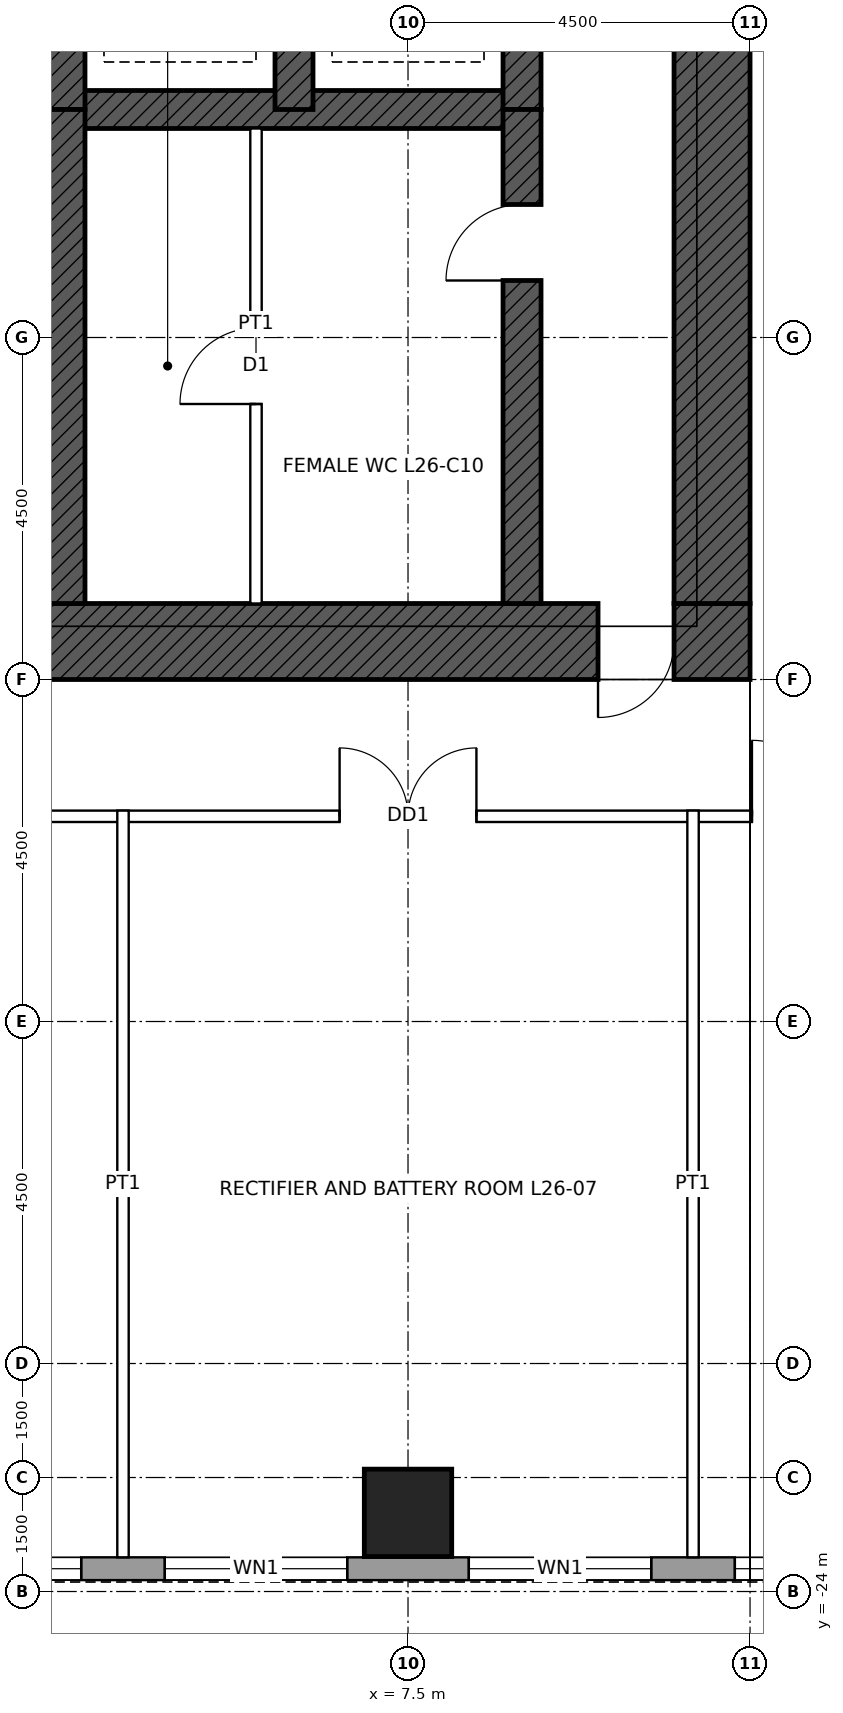
"""IFC4 building model, lengths in metres.
Left out: names, types, materials, properties, quantities, classifications, styles, units other than length and angle.
Written with IfcOpenShell. Run it as: python <this file> out.ifc"""

import sys

from ifc_helpers import new_model, si_unit, direction, frame, frame_2d, origin, origin_2d, place, context, subcontext, project, spatial, rectangle, hollow_rectangle, extrude, element, fill, save


model = new_model("IFC4")
c1 = context("Model", 3, precision=1e-05, world=origin(), true_north=direction((0.0, 1.0)))
c2 = subcontext(c1, "Body", "Model", "MODEL_VIEW")
j1 = project(units=[si_unit("LENGTHUNIT", "METRE"), si_unit("PLANEANGLEUNIT", "RADIAN")], contexts=[c1])
p1 = place(None, origin())
s1 = spatial("IfcSite", under=j1, at=p1, CompositionType="ELEMENT")
p2 = place(p1, origin())
s2 = spatial("IfcBuilding", under=s1, at=p2, CompositionType="ELEMENT")
p3 = place(p2, frame((0.0, 0.0, 131.4)))
s3 = spatial("IfcBuildingStorey", under=s2, at=p3, CompositionType="ELEMENT", Elevation=131.4)
p4 = place(p3, frame((7.5, -22.965, 0.0), z_axis=(0.0, 0.0, 1.0), x_axis=(1.0, 0.0, 0.0)))
e1 = element("IfcColumn", 1, at=p4, inside=s3, PredefinedType="COLUMN", context=c2, shape_type="SweptSolid", body=[
    extrude(hollow_rectangle(XDim=1.15, YDim=1.15, WallThickness=0.075, at=origin_2d()), origin(), (0.0, 0.0, 1.0), 4.5),
])
p5 = place(p3, frame((12.0, -11.5, 0.0), z_axis=(0.0, 0.0, 1.0), x_axis=(-1.0, 0.0, 0.0)))
e2 = element("IfcWall", 2, at=p5, inside=s3, PredefinedType="SHEAR", context=c2, shape_type="SweptSolid", body=[
    extrude(rectangle(XDim=24.0, YDim=1.0, at=frame_2d((12.0, 0.0))), origin(), (0.0, 0.0, 1.0), 4.5),
])
p6 = place(p5, frame((11.5, 0.0, 0.0)))
e3 = element("IfcOpeningElement", 3, at=p6, cuts=e2, PredefinedType="OPENING", context=c2, shape_type="SweptSolid", body=[
    extrude(rectangle(XDim=1.0, YDim=2.1, at=frame_2d((0.5, 1.05))), frame((0.0, 0.51, 0.0), z_axis=(0.0, -1.0, 0.0), x_axis=(1.0, 0.0, 0.0)), (0.0, 0.0, 1.0), 1.02),
])
p7 = place(p5, frame((1.0, 0.0, 0.0)))
e4 = element("IfcOpeningElement", 4, at=p7, cuts=e2, PredefinedType="OPENING", context=c2, shape_type="SweptSolid", body=[
    extrude(rectangle(XDim=1.0, YDim=2.4, at=frame_2d((0.5, 1.2))), frame((0.0, 0.51, 0.0), z_axis=(0.0, -1.0, 0.0), x_axis=(1.0, 0.0, 0.0)), (0.0, 0.0, 1.0), 1.02),
])
p8 = place(p3, frame((11.5, 11.0, 0.0), z_axis=(0.0, 0.0, 1.0), x_axis=(0.0, -1.0, 0.0)))
e5 = element("IfcWall", 5, at=p8, inside=s3, PredefinedType="SHEAR", context=c2, shape_type="SweptSolid", body=[
    extrude(rectangle(XDim=22.0, YDim=1.0, at=frame_2d((11.0, 0.0))), origin(), (0.0, 0.0, 1.0), 4.5),
])
p9 = place(p8, frame((10.5, 0.0, 0.0)))
e6 = element("IfcOpeningElement", 6, at=p9, cuts=e5, PredefinedType="OPENING", context=c2, shape_type="SweptSolid", body=[
    extrude(rectangle(XDim=1.0, YDim=2.4, at=frame_2d((0.5, 1.2))), frame((0.0, 0.51, 0.0), z_axis=(0.0, -1.0, 0.0), x_axis=(1.0, 0.0, 0.0)), (0.0, 0.0, 1.0), 1.02),
])
p10 = place(p3, frame((-9.0, -4.5, 0.0), z_axis=(0.0, 0.0, 1.0), x_axis=(1.0, 0.0, 0.0)))
e7 = element("IfcWall", 7, at=p10, inside=s3, PredefinedType="SHEAR", context=c2, shape_type="SweptSolid", body=[
    extrude(rectangle(XDim=18.0, YDim=0.5, at=frame_2d((9.0, 0.0))), origin(), (0.0, 0.0, 1.0), 4.5),
])
for number, where, z_axis, x_axis in (
    (8, (9.0, -4.5, 0.0), (0.0, 0.0, 1.0), (0.0, 1.0, 0.0)),
    (9, (3.0, -4.5, 0.0), (0.0, 0.0, 1.0), (0.0, 1.0, 0.0)),
    (10, (6.0, -4.5, 0.0), (0.0, 0.0, 1.0), (0.0, 1.0, 0.0)),
):
    element("IfcWall", number, at=place(p3, frame(where, z_axis=z_axis, x_axis=x_axis)), inside=s3, PredefinedType="SHEAR", context=c2, shape_type="SweptSolid", body=[
        extrude(rectangle(XDim=3.0, YDim=0.5, at=frame_2d((1.5, 0.0))), origin(), (0.0, 0.0, 1.0), 4.5),
    ])
p11 = place(p3, frame((9.0, -11.0, 0.0), z_axis=(0.0, 0.0, 1.0), x_axis=(0.0, 1.0, 0.0)))
e11 = element("IfcWall", 11, at=p11, inside=s3, PredefinedType="SHEAR", context=c2, shape_type="SweptSolid", body=[
    extrude(rectangle(XDim=6.5, YDim=0.5, at=frame_2d((3.25, 0.0))), origin(), (0.0, 0.0, 1.0), 4.5),
])
p12 = place(p11, frame((4.25, 0.0, 0.0)))
e12 = element("IfcOpeningElement", 12, at=p12, cuts=e11, PredefinedType="OPENING", context=c2, shape_type="SweptSolid", body=[
    extrude(rectangle(XDim=1.0, YDim=2.1, at=frame_2d((0.5, 1.05))), frame((0.0, 0.26, 0.0), z_axis=(0.0, -1.0, 0.0), x_axis=(1.0, 0.0, 0.0)), (0.0, 0.0, 1.0), 0.52),
])
p13 = place(p3, frame((3.0, -11.0, 0.0), z_axis=(0.0, 0.0, 1.0), x_axis=(0.0, 1.0, 0.0)))
e13 = element("IfcWall", 13, at=p13, inside=s3, PredefinedType="SHEAR", context=c2, shape_type="SweptSolid", body=[
    extrude(rectangle(XDim=6.5, YDim=0.5, at=frame_2d((3.25, 0.0))), origin(), (0.0, 0.0, 1.0), 4.5),
])
p14 = place(p3, frame((16.2, -23.7, 0.0), z_axis=(0.0, 0.0, 1.0), x_axis=(-1.0, 0.0, 0.0)))
e14 = element("IfcWall", 14, at=p14, inside=s3, PredefinedType="SOLIDWALL", context=c2, shape_type="SweptSolid", body=[
    extrude(rectangle(XDim=32.4, YDim=0.3, at=frame_2d((16.2, 0.0))), origin(), (0.0, 0.0, 1.0), 4.3),
])
p15 = place(p14, frame((2.0, 0.0, 1.0)))
e15 = element("IfcOpeningElement", 15, at=p15, cuts=e14, PredefinedType="OPENING", context=c2, shape_type="SweptSolid", body=[
    extrude(rectangle(XDim=2.4, YDim=1.2, at=frame_2d((1.2, 0.6))), frame((0.0, 0.16, 0.0), z_axis=(0.0, -1.0, 0.0), x_axis=(1.0, 0.0, 0.0)), (0.0, 0.0, 1.0), 0.32),
])
p16 = place(p14, frame((5.5, 0.0, 1.0)))
e16 = element("IfcOpeningElement", 16, at=p16, cuts=e14, PredefinedType="OPENING", context=c2, shape_type="SweptSolid", body=[
    extrude(rectangle(XDim=2.4, YDim=1.2, at=frame_2d((1.2, 0.6))), frame((0.0, 0.16, 0.0), z_axis=(0.0, -1.0, 0.0), x_axis=(1.0, 0.0, 0.0)), (0.0, 0.0, 1.0), 0.32),
])
p17 = place(p14, frame((9.5, 0.0, 1.0)))
e17 = element("IfcOpeningElement", 17, at=p17, cuts=e14, PredefinedType="OPENING", context=c2, shape_type="SweptSolid", body=[
    extrude(rectangle(XDim=2.4, YDim=1.2, at=frame_2d((1.2, 0.6))), frame((0.0, 0.16, 0.0), z_axis=(0.0, -1.0, 0.0), x_axis=(1.0, 0.0, 0.0)), (0.0, 0.0, 1.0), 0.32),
])
p18 = place(p14, frame((13.0, 0.0, 1.0)))
e18 = element("IfcOpeningElement", 18, at=p18, cuts=e14, PredefinedType="OPENING", context=c2, shape_type="SweptSolid", body=[
    extrude(rectangle(XDim=2.4, YDim=1.2, at=frame_2d((1.2, 0.6))), frame((0.0, 0.16, 0.0), z_axis=(0.0, -1.0, 0.0), x_axis=(1.0, 0.0, 0.0)), (0.0, 0.0, 1.0), 0.32),
])
p19 = place(p14, frame((17.0, 0.0, 1.0)))
e19 = element("IfcOpeningElement", 19, at=p19, cuts=e14, PredefinedType="OPENING", context=c2, shape_type="SweptSolid", body=[
    extrude(rectangle(XDim=2.4, YDim=1.2, at=frame_2d((1.2, 0.6))), frame((0.0, 0.16, 0.0), z_axis=(0.0, -1.0, 0.0), x_axis=(1.0, 0.0, 0.0)), (0.0, 0.0, 1.0), 0.32),
])
p20 = place(p14, frame((20.5, 0.0, 1.0)))
e20 = element("IfcOpeningElement", 20, at=p20, cuts=e14, PredefinedType="OPENING", context=c2, shape_type="SweptSolid", body=[
    extrude(rectangle(XDim=2.4, YDim=1.2, at=frame_2d((1.2, 0.6))), frame((0.0, 0.16, 0.0), z_axis=(0.0, -1.0, 0.0), x_axis=(1.0, 0.0, 0.0)), (0.0, 0.0, 1.0), 0.32),
])
p21 = place(p14, frame((24.5, 0.0, 1.0)))
e21 = element("IfcOpeningElement", 21, at=p21, cuts=e14, PredefinedType="OPENING", context=c2, shape_type="SweptSolid", body=[
    extrude(rectangle(XDim=2.4, YDim=1.2, at=frame_2d((1.2, 0.6))), frame((0.0, 0.16, 0.0), z_axis=(0.0, -1.0, 0.0), x_axis=(1.0, 0.0, 0.0)), (0.0, 0.0, 1.0), 0.32),
])
p22 = place(p14, frame((28.0, 0.0, 1.0)))
e22 = element("IfcOpeningElement", 22, at=p22, cuts=e14, PredefinedType="OPENING", context=c2, shape_type="SweptSolid", body=[
    extrude(rectangle(XDim=2.4, YDim=1.2, at=frame_2d((1.2, 0.6))), frame((0.0, 0.16, 0.0), z_axis=(0.0, -1.0, 0.0), x_axis=(1.0, 0.0, 0.0)), (0.0, 0.0, 1.0), 0.32),
])
p23 = place(p3, frame((-13.875, -13.8, 0.0), z_axis=(0.0, 0.0, 1.0), x_axis=(1.0, 0.0, 0.0)))
e23 = element("IfcWall", 23, at=p23, inside=s3, PredefinedType="PARTITIONING", context=c2, shape_type="SweptSolid", body=[
    extrude(rectangle(XDim=27.75, YDim=0.15, at=frame_2d((13.875, 0.0))), origin(), (0.0, 0.0, 1.0), 4.3),
])
p24 = place(p23, frame((20.475, 0.0, 0.0)))
e24 = element("IfcOpeningElement", 24, at=p24, cuts=e23, PredefinedType="OPENING", context=c2, shape_type="SweptSolid", body=[
    extrude(rectangle(XDim=1.8, YDim=2.4, at=frame_2d((0.9, 1.2))), frame((0.0, 0.085, 0.0), z_axis=(0.0, -1.0, 0.0), x_axis=(1.0, 0.0, 0.0)), (0.0, 0.0, 1.0), 0.17),
])
p25 = place(p23, frame((10.525, 0.0, 0.0)))
e25 = element("IfcOpeningElement", 25, at=p25, cuts=e23, PredefinedType="OPENING", context=c2, shape_type="SweptSolid", body=[
    extrude(rectangle(XDim=1.8, YDim=2.4, at=frame_2d((0.9, 1.2))), frame((0.0, 0.085, 0.0), z_axis=(0.0, -1.0, 0.0), x_axis=(1.0, 0.0, 0.0)), (0.0, 0.0, 1.0), 0.17),
])
p26 = place(p23, frame((5.475, 0.0, 0.0)))
e26 = element("IfcOpeningElement", 26, at=p26, cuts=e23, PredefinedType="OPENING", context=c2, shape_type="SweptSolid", body=[
    extrude(rectangle(XDim=1.8, YDim=2.4, at=frame_2d((0.9, 1.2))), frame((0.0, 0.085, 0.0), z_axis=(0.0, -1.0, 0.0), x_axis=(1.0, 0.0, 0.0)), (0.0, 0.0, 1.0), 0.17),
])
p27 = place(p23, frame((25.9, 0.0, 0.0)))
e27 = element("IfcOpeningElement", 27, at=p27, cuts=e23, PredefinedType="OPENING", context=c2, shape_type="SweptSolid", body=[
    extrude(rectangle(XDim=1.0, YDim=2.1, at=frame_2d((0.5, 1.05))), frame((0.0, 0.085, 0.0), z_axis=(0.0, -1.0, 0.0), x_axis=(1.0, 0.0, 0.0)), (0.0, 0.0, 1.0), 0.17),
])
p28 = place(p23, frame((0.85, 0.0, 0.0)))
e28 = element("IfcOpeningElement", 28, at=p28, cuts=e23, PredefinedType="OPENING", context=c2, shape_type="SweptSolid", body=[
    extrude(rectangle(XDim=1.0, YDim=2.1, at=frame_2d((0.5, 1.05))), frame((0.0, 0.085, 0.0), z_axis=(0.0, -1.0, 0.0), x_axis=(1.0, 0.0, 0.0)), (0.0, 0.0, 1.0), 0.17),
])
for number, where, z_axis, x_axis in (
    (29, (3.75, -23.55, 0.0), (0.0, 0.0, 1.0), (0.0, 1.0, 0.0)),
    (30, (11.25, -23.55, 0.0), (0.0, 0.0, 1.0), (0.0, 1.0, 0.0)),
):
    element("IfcWall", number, at=place(p3, frame(where, z_axis=z_axis, x_axis=x_axis)), inside=s3, PredefinedType="PARTITIONING", context=c2, shape_type="SweptSolid", body=[
        extrude(rectangle(XDim=9.825, YDim=0.15, at=frame_2d((4.913, 0.0))), origin(), (0.0, 0.0, 1.0), 3.431),
    ])
p29 = place(p3, frame((5.5, -11.0, 0.0), z_axis=(0.0, 0.0, 1.0), x_axis=(0.0, 1.0, 0.0)))
e31 = element("IfcWall", 31, at=p29, inside=s3, PredefinedType="PARTITIONING", context=c2, shape_type="SweptSolid", body=[
    extrude(rectangle(XDim=6.25, YDim=0.15, at=frame_2d((3.125, 0.0))), origin(), (0.0, 0.0, 1.0), 4.25),
])
p30 = place(p29, frame((2.625, 0.0, 0.0)))
e32 = element("IfcOpeningElement", 32, at=p30, cuts=e31, PredefinedType="OPENING", context=c2, shape_type="SweptSolid", body=[
    extrude(rectangle(XDim=1.0, YDim=2.1, at=frame_2d((0.5, 1.05))), frame((0.0, 0.085, 0.0), z_axis=(0.0, -1.0, 0.0), x_axis=(1.0, 0.0, 0.0)), (0.0, 0.0, 1.0), 0.17),
])
p31 = place(p15, origin())
e33 = element("IfcWindow", 33, at=p31, inside=s3, PartitioningType="SINGLE_PANEL", PredefinedType="WINDOW", context=c2, shape_type="SweptSolid", body=[
    extrude(rectangle(XDim=2.4, YDim=1.2, at=frame_2d((1.2, 0.6))), frame((0.0, 0.03, 0.0), z_axis=(0.0, -1.0, 0.0), x_axis=(1.0, 0.0, 0.0)), (0.0, 0.0, 1.0), 0.06),
])
fill(e15, e33)
p32 = place(p16, origin())
e34 = element("IfcWindow", 34, at=p32, inside=s3, PartitioningType="SINGLE_PANEL", PredefinedType="WINDOW", context=c2, shape_type="SweptSolid", body=[
    extrude(rectangle(XDim=2.4, YDim=1.2, at=frame_2d((1.2, 0.6))), frame((0.0, 0.03, 0.0), z_axis=(0.0, -1.0, 0.0), x_axis=(1.0, 0.0, 0.0)), (0.0, 0.0, 1.0), 0.06),
])
fill(e16, e34)
p33 = place(p17, origin())
e35 = element("IfcWindow", 35, at=p33, inside=s3, PartitioningType="SINGLE_PANEL", PredefinedType="WINDOW", context=c2, shape_type="SweptSolid", body=[
    extrude(rectangle(XDim=2.4, YDim=1.2, at=frame_2d((1.2, 0.6))), frame((0.0, 0.03, 0.0), z_axis=(0.0, -1.0, 0.0), x_axis=(1.0, 0.0, 0.0)), (0.0, 0.0, 1.0), 0.06),
])
fill(e17, e35)
p34 = place(p18, origin())
e36 = element("IfcWindow", 36, at=p34, inside=s3, PartitioningType="SINGLE_PANEL", PredefinedType="WINDOW", context=c2, shape_type="SweptSolid", body=[
    extrude(rectangle(XDim=2.4, YDim=1.2, at=frame_2d((1.2, 0.6))), frame((0.0, 0.03, 0.0), z_axis=(0.0, -1.0, 0.0), x_axis=(1.0, 0.0, 0.0)), (0.0, 0.0, 1.0), 0.06),
])
fill(e18, e36)
p35 = place(p7, origin())
e37 = element("IfcDoor", 37, at=p35, inside=s3, OperationType="SINGLE_SWING_RIGHT", PredefinedType="DOOR", context=c2, shape_type="SweptSolid", body=[
    extrude(rectangle(XDim=1.0, YDim=2.4, at=frame_2d((0.5, 1.2))), frame((0.0, 0.485, 0.0), z_axis=(0.0, -1.0, 0.0), x_axis=(1.0, 0.0, 0.0)), (0.0, 0.0, 1.0), 0.05),
])
fill(e4, e37)
p36 = place(p12, origin())
e38 = element("IfcDoor", 38, at=p36, inside=s3, OperationType="SINGLE_SWING_LEFT", PredefinedType="DOOR", context=c2, shape_type="SweptSolid", body=[
    extrude(rectangle(XDim=1.0, YDim=2.1, at=frame_2d((0.5, 1.05))), frame((0.0, 0.025, 0.0), z_axis=(0.0, -1.0, 0.0), x_axis=(1.0, 0.0, 0.0)), (0.0, 0.0, 1.0), 0.05),
])
fill(e12, e38)
p37 = place(p30, origin())
e39 = element("IfcDoor", 39, at=p37, inside=s3, OperationType="SINGLE_SWING_LEFT", PredefinedType="DOOR", context=c2, shape_type="SweptSolid", body=[
    extrude(rectangle(XDim=1.0, YDim=2.1, at=frame_2d((0.5, 1.05))), frame((0.0, 0.025, 0.0), z_axis=(0.0, -1.0, 0.0), x_axis=(1.0, 0.0, 0.0)), (0.0, 0.0, 1.0), 0.05),
])
fill(e32, e39)
p38 = place(p24, origin())
e40 = element("IfcDoor", 40, at=p38, inside=s3, OperationType="DOUBLE_DOOR_SINGLE_SWING", PredefinedType="DOOR", context=c2, shape_type="SweptSolid", body=[
    extrude(rectangle(XDim=1.8, YDim=2.4, at=frame_2d((0.9, 1.2))), frame((0.0, 0.025, 0.0), z_axis=(0.0, -1.0, 0.0), x_axis=(1.0, 0.0, 0.0)), (0.0, 0.0, 1.0), 0.05),
])
fill(e24, e40)
p39 = place(p27, origin())
e41 = element("IfcDoor", 41, at=p39, inside=s3, OperationType="SINGLE_SWING_LEFT", PredefinedType="DOOR", context=c2, shape_type="SweptSolid", body=[
    extrude(rectangle(XDim=1.0, YDim=2.1, at=frame_2d((0.5, 1.05))), frame((0.0, 0.025, 0.0), z_axis=(0.0, -1.0, 0.0), x_axis=(1.0, 0.0, 0.0)), (0.0, 0.0, 1.0), 0.05),
])
fill(e27, e41)
save(model, sys.argv[1])
